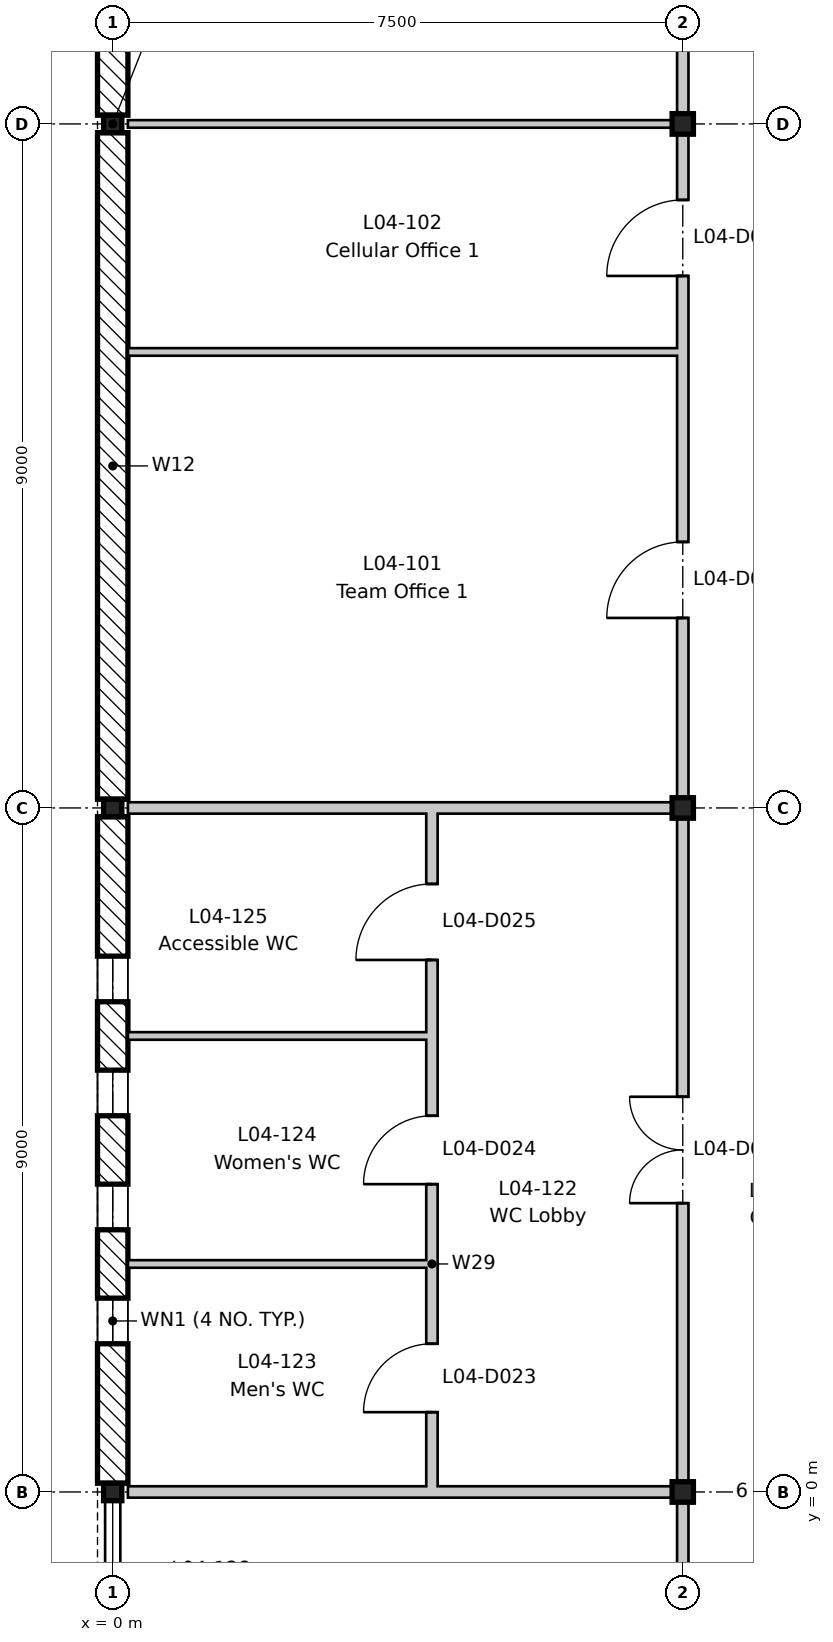
"""IFC4 building model, lengths in metres.
Left out: names, types, materials, properties, quantities, classifications, styles, units other than length and angle.
Written with IfcOpenShell. Run it as: python <this file> out.ifc"""

import sys

from ifc_helpers import new_model, si_unit, direction, frame, frame_2d, origin, origin_2d, place, context, subcontext, project, spatial, rectangle, i_section, extrude, element, fill, save


model = new_model("IFC4")
c1 = context("Model", 3, precision=1e-05, world=origin(), true_north=direction((0.0, 1.0)))
c2 = subcontext(c1, "Body", "Model", "MODEL_VIEW")
j1 = project(units=[si_unit("LENGTHUNIT", "METRE"), si_unit("PLANEANGLEUNIT", "RADIAN")], contexts=[c1])
p1 = place(None, origin())
s1 = spatial("IfcSite", under=j1, at=p1, CompositionType="ELEMENT")
p2 = place(p1, origin())
s2 = spatial("IfcBuilding", under=s1, at=p2, CompositionType="ELEMENT")
p3 = place(p2, frame((0.0, 0.0, 18.6)))
s3 = spatial("IfcBuildingStorey", under=s2, at=p3, CompositionType="ELEMENT", Elevation=18.6)
for number, where, z_axis, x_axis in (
    (1, (0.0, 0.0, -0.2), (0.0, 0.0, 1.0), (1.0, 0.0, 0.0)),
    (2, (0.0, 9.0, -0.2), (0.0, 0.0, 1.0), (1.0, 0.0, 0.0)),
    (3, (0.0, 18.0, -0.2), (0.0, 0.0, 1.0), (1.0, 0.0, 0.0)),
):
    element("IfcColumn", number, at=place(p3, frame(where, z_axis=z_axis, x_axis=x_axis)), inside=s3, PredefinedType="COLUMN", context=c2, shape_type="SweptSolid", body=[
        extrude(i_section(OverallWidth=0.24, OverallDepth=0.23, WebThickness=0.008, FlangeThickness=0.012, FilletRadius=0.021, at=origin_2d()), origin(), (0.0, 0.0, 1.0), 4.2),
    ])
for number, where, z_axis, x_axis in (
    (4, (7.5, 0.0, -0.2), (0.0, 0.0, 1.0), (1.0, 0.0, 0.0)),
    (5, (7.5, 9.0, -0.2), (0.0, 0.0, 1.0), (1.0, 0.0, 0.0)),
    (6, (7.5, 18.0, -0.2), (0.0, 0.0, 1.0), (1.0, 0.0, 0.0)),
):
    element("IfcColumn", number, at=place(p3, frame(where, z_axis=z_axis, x_axis=x_axis)), inside=s3, PredefinedType="COLUMN", context=c2, shape_type="SweptSolid", body=[
        extrude(i_section(OverallWidth=0.28, OverallDepth=0.27, WebThickness=0.008, FlangeThickness=0.013, FilletRadius=0.024, at=origin_2d()), origin(), (0.0, 0.0, 1.0), 4.2),
    ])
p4 = place(p3, frame((0.0, 0.115, 0.0), z_axis=(0.0, 0.0, 1.0), x_axis=(0.0, 1.0, 0.0)))
e7 = element("IfcWall", 7, at=p4, inside=s3, PredefinedType="STANDARD", context=c2, shape_type="SweptSolid", body=[
    extrude(rectangle(XDim=8.77, YDim=0.4, at=frame_2d((4.385, 0.0))), origin(), (0.0, 0.0, 1.0), 3.6),
])
p5 = place(p4, frame((1.835, 0.0, 1.5)))
e8 = element("IfcOpeningElement", 8, at=p5, cuts=e7, PredefinedType="OPENING", context=c2, shape_type="SweptSolid", body=[
    extrude(rectangle(XDim=0.6, YDim=1.2, at=frame_2d((0.3, 0.6))), frame((0.0, 0.21, 0.0), z_axis=(0.0, -1.0, 0.0), x_axis=(1.0, 0.0, 0.0)), (0.0, 0.0, 1.0), 0.42),
])
p6 = place(p4, frame((3.335, 0.0, 1.5)))
e9 = element("IfcOpeningElement", 9, at=p6, cuts=e7, PredefinedType="OPENING", context=c2, shape_type="SweptSolid", body=[
    extrude(rectangle(XDim=0.6, YDim=1.2, at=frame_2d((0.3, 0.6))), frame((0.0, 0.21, 0.0), z_axis=(0.0, -1.0, 0.0), x_axis=(1.0, 0.0, 0.0)), (0.0, 0.0, 1.0), 0.42),
])
p7 = place(p4, frame((4.835, 0.0, 1.5)))
e10 = element("IfcOpeningElement", 10, at=p7, cuts=e7, PredefinedType="OPENING", context=c2, shape_type="SweptSolid", body=[
    extrude(rectangle(XDim=0.6, YDim=1.2, at=frame_2d((0.3, 0.6))), frame((0.0, 0.21, 0.0), z_axis=(0.0, -1.0, 0.0), x_axis=(1.0, 0.0, 0.0)), (0.0, 0.0, 1.0), 0.42),
])
p8 = place(p4, frame((6.335, 0.0, 1.5)))
e11 = element("IfcOpeningElement", 11, at=p8, cuts=e7, PredefinedType="OPENING", context=c2, shape_type="SweptSolid", body=[
    extrude(rectangle(XDim=0.6, YDim=1.2, at=frame_2d((0.3, 0.6))), frame((0.0, 0.21, 0.0), z_axis=(0.0, -1.0, 0.0), x_axis=(1.0, 0.0, 0.0)), (0.0, 0.0, 1.0), 0.42),
])
p9 = place(p3, frame((0.0, 9.115, 0.0), z_axis=(0.0, 0.0, 1.0), x_axis=(0.0, 1.0, 0.0)))
e12 = element("IfcWall", 12, at=p9, inside=s3, PredefinedType="STANDARD", context=c2, shape_type="SweptSolid", body=[
    extrude(rectangle(XDim=8.77, YDim=0.4, at=frame_2d((4.385, 0.0))), origin(), (0.0, 0.0, 1.0), 3.6),
])
p10 = place(p3, frame((0.0, 18.115, 0.0), z_axis=(0.0, 0.0, 1.0), x_axis=(0.0, 1.0, 0.0)))
e13 = element("IfcWall", 13, at=p10, inside=s3, PredefinedType="STANDARD", context=c2, shape_type="SweptSolid", body=[
    extrude(rectangle(XDim=8.77, YDim=0.4, at=frame_2d((4.385, 0.0))), origin(), (0.0, 0.0, 1.0), 3.6),
])
p11 = place(p10, frame((1.535, 0.0, 0.6)))
e14 = element("IfcOpeningElement", 14, at=p11, cuts=e13, PredefinedType="OPENING", context=c2, shape_type="SweptSolid", body=[
    extrude(rectangle(XDim=1.2, YDim=2.7, at=frame_2d((0.6, 1.35))), frame((0.0, 0.21, 0.0), z_axis=(0.0, -1.0, 0.0), x_axis=(1.0, 0.0, 0.0)), (0.0, 0.0, 1.0), 0.42),
])
p12 = place(p10, frame((3.035, 0.0, 0.6)))
e15 = element("IfcOpeningElement", 15, at=p12, cuts=e13, PredefinedType="OPENING", context=c2, shape_type="SweptSolid", body=[
    extrude(rectangle(XDim=1.2, YDim=2.7, at=frame_2d((0.6, 1.35))), frame((0.0, 0.21, 0.0), z_axis=(0.0, -1.0, 0.0), x_axis=(1.0, 0.0, 0.0)), (0.0, 0.0, 1.0), 0.42),
])
p13 = place(p10, frame((4.535, 0.0, 0.6)))
e16 = element("IfcOpeningElement", 16, at=p13, cuts=e13, PredefinedType="OPENING", context=c2, shape_type="SweptSolid", body=[
    extrude(rectangle(XDim=1.2, YDim=2.7, at=frame_2d((0.6, 1.35))), frame((0.0, 0.21, 0.0), z_axis=(0.0, -1.0, 0.0), x_axis=(1.0, 0.0, 0.0)), (0.0, 0.0, 1.0), 0.42),
])
p14 = place(p10, frame((6.035, 0.0, 0.6)))
e17 = element("IfcOpeningElement", 17, at=p14, cuts=e13, PredefinedType="OPENING", context=c2, shape_type="SweptSolid", body=[
    extrude(rectangle(XDim=1.2, YDim=2.7, at=frame_2d((0.6, 1.35))), frame((0.0, 0.21, 0.0), z_axis=(0.0, -1.0, 0.0), x_axis=(1.0, 0.0, 0.0)), (0.0, 0.0, 1.0), 0.42),
])
p15 = place(p3, frame((0.2, 9.0, 0.0), z_axis=(0.0, 0.0, 1.0), x_axis=(1.0, 0.0, 0.0)))
e18 = element("IfcWall", 18, at=p15, inside=s3, PredefinedType="PARTITIONING", context=c2, shape_type="SweptSolid", body=[
    extrude(rectangle(XDim=7.225, YDim=0.15, at=frame_2d((3.613, 0.0))), origin(), (0.0, 0.0, 1.0), 3.65),
])
p16 = place(p3, frame((0.2, 15.0, 0.0), z_axis=(0.0, 0.0, 1.0), x_axis=(1.0, 0.0, 0.0)))
e19 = element("IfcWall", 19, at=p16, inside=s3, PredefinedType="PARTITIONING", context=c2, shape_type="SweptSolid", body=[
    extrude(rectangle(XDim=7.225, YDim=0.1, at=frame_2d((3.613, 0.0))), origin(), (0.0, 0.0, 1.0), 4.0),
])
p17 = place(p3, frame((0.2, 18.0, 0.0), z_axis=(0.0, 0.0, 1.0), x_axis=(1.0, 0.0, 0.0)))
e20 = element("IfcWall", 20, at=p17, inside=s3, PredefinedType="PARTITIONING", context=c2, shape_type="SweptSolid", body=[
    extrude(rectangle(XDim=7.225, YDim=0.1, at=frame_2d((3.613, 0.0))), origin(), (0.0, 0.0, 1.0), 3.65),
])
p18 = place(p3, frame((0.2, 0.0, 0.0), z_axis=(0.0, 0.0, 1.0), x_axis=(1.0, 0.0, 0.0)))
e21 = element("IfcWall", 21, at=p18, inside=s3, PredefinedType="PARTITIONING", context=c2, shape_type="SweptSolid", body=[
    extrude(rectangle(XDim=7.225, YDim=0.15, at=frame_2d((3.613, 0.0))), origin(), (0.0, 0.0, 1.0), 3.65),
])
p19 = place(p3, frame((7.5, -8.8, 0.0), z_axis=(0.0, 0.0, 1.0), x_axis=(0.0, 1.0, 0.0)))
e22 = element("IfcWall", 22, at=p19, inside=s3, PredefinedType="PARTITIONING", context=c2, shape_type="SweptSolid", body=[
    extrude(rectangle(XDim=79.3, YDim=0.15, at=frame_2d((39.65, 0.0))), origin(), (0.0, 0.0, 1.0), 3.48),
])
p20 = place(p19, frame((20.3, 0.0, 0.0)))
e23 = element("IfcOpeningElement", 23, at=p20, cuts=e22, PredefinedType="OPENING", context=c2, shape_type="SweptSolid", body=[
    extrude(rectangle(XDim=1.0, YDim=2.1, at=frame_2d((0.5, 1.05))), frame((0.0, 0.085, 0.0), z_axis=(0.0, -1.0, 0.0), x_axis=(1.0, 0.0, 0.0)), (0.0, 0.0, 1.0), 0.17),
])
p21 = place(p19, frame((24.8, 0.0, 0.0)))
e24 = element("IfcOpeningElement", 24, at=p21, cuts=e22, PredefinedType="OPENING", context=c2, shape_type="SweptSolid", body=[
    extrude(rectangle(XDim=1.0, YDim=2.1, at=frame_2d((0.5, 1.05))), frame((0.0, 0.085, 0.0), z_axis=(0.0, -1.0, 0.0), x_axis=(1.0, 0.0, 0.0)), (0.0, 0.0, 1.0), 0.17),
])
p22 = place(p19, frame((30.6, 0.0, 0.0)))
e25 = element("IfcOpeningElement", 25, at=p22, cuts=e22, PredefinedType="OPENING", context=c2, shape_type="SweptSolid", body=[
    extrude(rectangle(XDim=1.4, YDim=2.1, at=frame_2d((0.7, 1.05))), frame((0.0, 0.085, 0.0), z_axis=(0.0, -1.0, 0.0), x_axis=(1.0, 0.0, 0.0)), (0.0, 0.0, 1.0), 0.17),
])
p23 = place(p19, frame((47.3, 0.0, 0.0)))
e26 = element("IfcOpeningElement", 26, at=p23, cuts=e22, PredefinedType="OPENING", context=c2, shape_type="SweptSolid", body=[
    extrude(rectangle(XDim=1.0, YDim=2.1, at=frame_2d((0.5, 1.05))), frame((0.0, 0.085, 0.0), z_axis=(0.0, -1.0, 0.0), x_axis=(1.0, 0.0, 0.0)), (0.0, 0.0, 1.0), 0.17),
])
p24 = place(p19, frame((51.8, 0.0, 0.0)))
e27 = element("IfcOpeningElement", 27, at=p24, cuts=e22, PredefinedType="OPENING", context=c2, shape_type="SweptSolid", body=[
    extrude(rectangle(XDim=1.0, YDim=2.1, at=frame_2d((0.5, 1.05))), frame((0.0, 0.085, 0.0), z_axis=(0.0, -1.0, 0.0), x_axis=(1.0, 0.0, 0.0)), (0.0, 0.0, 1.0), 0.17),
])
p25 = place(p19, frame((54.8, 0.0, 0.0)))
e28 = element("IfcOpeningElement", 28, at=p25, cuts=e22, PredefinedType="OPENING", context=c2, shape_type="SweptSolid", body=[
    extrude(rectangle(XDim=1.0, YDim=2.1, at=frame_2d((0.5, 1.05))), frame((0.0, 0.085, 0.0), z_axis=(0.0, -1.0, 0.0), x_axis=(1.0, 0.0, 0.0)), (0.0, 0.0, 1.0), 0.17),
])
p26 = place(p19, frame((59.3, 0.0, 0.0)))
e29 = element("IfcOpeningElement", 29, at=p26, cuts=e22, PredefinedType="OPENING", context=c2, shape_type="SweptSolid", body=[
    extrude(rectangle(XDim=1.0, YDim=2.1, at=frame_2d((0.5, 1.05))), frame((0.0, 0.085, 0.0), z_axis=(0.0, -1.0, 0.0), x_axis=(1.0, 0.0, 0.0)), (0.0, 0.0, 1.0), 0.17),
])
p27 = place(p19, frame((12.6, 0.0, 0.0)))
e30 = element("IfcOpeningElement", 30, at=p27, cuts=e22, PredefinedType="OPENING", context=c2, shape_type="SweptSolid", body=[
    extrude(rectangle(XDim=1.4, YDim=2.1, at=frame_2d((0.7, 1.05))), frame((0.0, 0.085, 0.0), z_axis=(0.0, -1.0, 0.0), x_axis=(1.0, 0.0, 0.0)), (0.0, 0.0, 1.0), 0.17),
])
p28 = place(p19, frame((3.6, 0.0, 0.0)))
e31 = element("IfcOpeningElement", 31, at=p28, cuts=e22, PredefinedType="OPENING", context=c2, shape_type="SweptSolid", body=[
    extrude(rectangle(XDim=1.4, YDim=2.1, at=frame_2d((0.7, 1.05))), frame((0.0, 0.085, 0.0), z_axis=(0.0, -1.0, 0.0), x_axis=(1.0, 0.0, 0.0)), (0.0, 0.0, 1.0), 0.17),
])
p29 = place(p19, frame((63.55, 0.0, 0.0)))
e32 = element("IfcOpeningElement", 32, at=p29, cuts=e22, PredefinedType="OPENING", context=c2, shape_type="SweptSolid", body=[
    extrude(rectangle(XDim=1.4, YDim=2.1, at=frame_2d((0.7, 1.05))), frame((0.0, 0.085, 0.0), z_axis=(0.0, -1.0, 0.0), x_axis=(1.0, 0.0, 0.0)), (0.0, 0.0, 1.0), 0.17),
])
p30 = place(p19, frame((69.6, 0.0, 0.0)))
e33 = element("IfcOpeningElement", 33, at=p30, cuts=e22, PredefinedType="OPENING", context=c2, shape_type="SweptSolid", body=[
    extrude(rectangle(XDim=1.4, YDim=2.1, at=frame_2d((0.7, 1.05))), frame((0.0, 0.085, 0.0), z_axis=(0.0, -1.0, 0.0), x_axis=(1.0, 0.0, 0.0)), (0.0, 0.0, 1.0), 0.17),
])
p31 = place(p19, frame((42.85, 0.0, 0.0)))
e34 = element("IfcOpeningElement", 34, at=p31, cuts=e22, PredefinedType="OPENING", context=c2, shape_type="SweptSolid", body=[
    extrude(rectangle(XDim=1.0, YDim=2.1, at=frame_2d((0.5, 1.05))), frame((0.0, 0.085, 0.0), z_axis=(0.0, -1.0, 0.0), x_axis=(1.0, 0.0, 0.0)), (0.0, 0.0, 1.0), 0.17),
])
p32 = place(p19, frame((36.55, 0.0, 0.0)))
e35 = element("IfcOpeningElement", 35, at=p32, cuts=e22, PredefinedType="OPENING", context=c2, shape_type="SweptSolid", body=[
    extrude(rectangle(XDim=1.4, YDim=2.1, at=frame_2d((0.7, 1.05))), frame((0.0, 0.085, 0.0), z_axis=(0.0, -1.0, 0.0), x_axis=(1.0, 0.0, 0.0)), (0.0, 0.0, 1.0), 0.17),
])
p33 = place(p19, frame((72.8, 0.0, 0.0)))
e36 = element("IfcOpeningElement", 36, at=p33, cuts=e22, PredefinedType="OPENING", context=c2, shape_type="SweptSolid", body=[
    extrude(rectangle(XDim=1.0, YDim=2.1, at=frame_2d((0.5, 1.05))), frame((0.0, 0.085, 0.0), z_axis=(0.0, -1.0, 0.0), x_axis=(1.0, 0.0, 0.0)), (0.0, 0.0, 1.0), 0.17),
])
p34 = place(p3, frame((4.2, 0.075, 0.0), z_axis=(0.0, 0.0, 1.0), x_axis=(0.0, 1.0, 0.0)))
e37 = element("IfcWall", 37, at=p34, inside=s3, PredefinedType="PARTITIONING", context=c2, shape_type="SweptSolid", body=[
    extrude(rectangle(XDim=8.85, YDim=0.15, at=frame_2d((4.425, 0.0))), origin(), (0.0, 0.0, 1.0), 4.0),
])
p35 = place(p34, frame((0.975, 0.0, 0.0)))
e38 = element("IfcOpeningElement", 38, at=p35, cuts=e37, PredefinedType="OPENING", context=c2, shape_type="SweptSolid", body=[
    extrude(rectangle(XDim=0.9, YDim=2.1, at=frame_2d((0.45, 1.05))), frame((0.0, 0.085, 0.0), z_axis=(0.0, -1.0, 0.0), x_axis=(1.0, 0.0, 0.0)), (0.0, 0.0, 1.0), 0.17),
])
p36 = place(p34, frame((3.975, 0.0, 0.0)))
e39 = element("IfcOpeningElement", 39, at=p36, cuts=e37, PredefinedType="OPENING", context=c2, shape_type="SweptSolid", body=[
    extrude(rectangle(XDim=0.9, YDim=2.1, at=frame_2d((0.45, 1.05))), frame((0.0, 0.085, 0.0), z_axis=(0.0, -1.0, 0.0), x_axis=(1.0, 0.0, 0.0)), (0.0, 0.0, 1.0), 0.17),
])
p37 = place(p34, frame((6.925, 0.0, 0.0)))
e40 = element("IfcOpeningElement", 40, at=p37, cuts=e37, PredefinedType="OPENING", context=c2, shape_type="SweptSolid", body=[
    extrude(rectangle(XDim=1.0, YDim=2.1, at=frame_2d((0.5, 1.05))), frame((0.0, 0.085, 0.0), z_axis=(0.0, -1.0, 0.0), x_axis=(1.0, 0.0, 0.0)), (0.0, 0.0, 1.0), 0.17),
])
for number, where, z_axis, x_axis in (
    (41, (0.2, 3.0, 0.0), (0.0, 0.0, 1.0), (1.0, 0.0, 0.0)),
    (42, (0.2, 6.0, 0.0), (0.0, 0.0, 1.0), (1.0, 0.0, 0.0)),
):
    element("IfcWall", number, at=place(p3, frame(where, z_axis=z_axis, x_axis=x_axis)), inside=s3, PredefinedType="PARTITIONING", context=c2, shape_type="SweptSolid", body=[
        extrude(rectangle(XDim=3.925, YDim=0.1, at=frame_2d((1.962, 0.0))), origin(), (0.0, 0.0, 1.0), 4.0),
    ])
p38 = place(p5, origin())
e43 = element("IfcWindow", 43, at=p38, inside=s3, PartitioningType="SINGLE_PANEL", PredefinedType="WINDOW", context=c2, shape_type="SweptSolid", body=[
    extrude(rectangle(XDim=0.6, YDim=1.2, at=frame_2d((0.3, 0.6))), frame((0.0, 0.03, 0.0), z_axis=(0.0, -1.0, 0.0), x_axis=(1.0, 0.0, 0.0)), (0.0, 0.0, 1.0), 0.06),
])
fill(e8, e43)
p39 = place(p6, origin())
e44 = element("IfcWindow", 44, at=p39, inside=s3, PartitioningType="SINGLE_PANEL", PredefinedType="WINDOW", context=c2, shape_type="SweptSolid", body=[
    extrude(rectangle(XDim=0.6, YDim=1.2, at=frame_2d((0.3, 0.6))), frame((0.0, 0.03, 0.0), z_axis=(0.0, -1.0, 0.0), x_axis=(1.0, 0.0, 0.0)), (0.0, 0.0, 1.0), 0.06),
])
fill(e9, e44)
p40 = place(p7, origin())
e45 = element("IfcWindow", 45, at=p40, inside=s3, PartitioningType="SINGLE_PANEL", PredefinedType="WINDOW", context=c2, shape_type="SweptSolid", body=[
    extrude(rectangle(XDim=0.6, YDim=1.2, at=frame_2d((0.3, 0.6))), frame((0.0, 0.03, 0.0), z_axis=(0.0, -1.0, 0.0), x_axis=(1.0, 0.0, 0.0)), (0.0, 0.0, 1.0), 0.06),
])
fill(e10, e45)
p41 = place(p8, origin())
e46 = element("IfcWindow", 46, at=p41, inside=s3, PartitioningType="SINGLE_PANEL", PredefinedType="WINDOW", context=c2, shape_type="SweptSolid", body=[
    extrude(rectangle(XDim=0.6, YDim=1.2, at=frame_2d((0.3, 0.6))), frame((0.0, 0.03, 0.0), z_axis=(0.0, -1.0, 0.0), x_axis=(1.0, 0.0, 0.0)), (0.0, 0.0, 1.0), 0.06),
])
fill(e11, e46)
p42 = place(p20, origin())
e47 = element("IfcDoor", 47, at=p42, inside=s3, OperationType="SINGLE_SWING_LEFT", PredefinedType="DOOR", context=c2, shape_type="SweptSolid", body=[
    extrude(rectangle(XDim=1.0, YDim=2.1, at=frame_2d((0.5, 1.05))), frame((0.0, 0.025, 0.0), z_axis=(0.0, -1.0, 0.0), x_axis=(1.0, 0.0, 0.0)), (0.0, 0.0, 1.0), 0.05),
])
fill(e23, e47)
p43 = place(p21, origin())
e48 = element("IfcDoor", 48, at=p43, inside=s3, OperationType="SINGLE_SWING_LEFT", PredefinedType="DOOR", context=c2, shape_type="SweptSolid", body=[
    extrude(rectangle(XDim=1.0, YDim=2.1, at=frame_2d((0.5, 1.05))), frame((0.0, 0.025, 0.0), z_axis=(0.0, -1.0, 0.0), x_axis=(1.0, 0.0, 0.0)), (0.0, 0.0, 1.0), 0.05),
])
fill(e24, e48)
p44 = place(p27, origin())
e49 = element("IfcDoor", 49, at=p44, inside=s3, OperationType="DOUBLE_DOOR_SINGLE_SWING", PredefinedType="DOOR", context=c2, shape_type="SweptSolid", body=[
    extrude(rectangle(XDim=1.4, YDim=2.1, at=frame_2d((0.7, 1.05))), frame((0.0, 0.025, 0.0), z_axis=(0.0, -1.0, 0.0), x_axis=(1.0, 0.0, 0.0)), (0.0, 0.0, 1.0), 0.05),
])
fill(e30, e49)
p45 = place(p35, origin())
e50 = element("IfcDoor", 50, at=p45, inside=s3, OperationType="SINGLE_SWING_LEFT", PredefinedType="DOOR", context=c2, shape_type="SweptSolid", body=[
    extrude(rectangle(XDim=0.9, YDim=2.1, at=frame_2d((0.45, 1.05))), frame((0.0, 0.025, 0.0), z_axis=(0.0, -1.0, 0.0), x_axis=(1.0, 0.0, 0.0)), (0.0, 0.0, 1.0), 0.05),
])
fill(e38, e50)
p46 = place(p36, origin())
e51 = element("IfcDoor", 51, at=p46, inside=s3, OperationType="SINGLE_SWING_LEFT", PredefinedType="DOOR", context=c2, shape_type="SweptSolid", body=[
    extrude(rectangle(XDim=0.9, YDim=2.1, at=frame_2d((0.45, 1.05))), frame((0.0, 0.025, 0.0), z_axis=(0.0, -1.0, 0.0), x_axis=(1.0, 0.0, 0.0)), (0.0, 0.0, 1.0), 0.05),
])
fill(e39, e51)
p47 = place(p37, origin())
e52 = element("IfcDoor", 52, at=p47, inside=s3, OperationType="SINGLE_SWING_LEFT", PredefinedType="DOOR", context=c2, shape_type="SweptSolid", body=[
    extrude(rectangle(XDim=1.0, YDim=2.1, at=frame_2d((0.5, 1.05))), frame((0.0, 0.025, 0.0), z_axis=(0.0, -1.0, 0.0), x_axis=(1.0, 0.0, 0.0)), (0.0, 0.0, 1.0), 0.05),
])
fill(e40, e52)
save(model, sys.argv[1])
